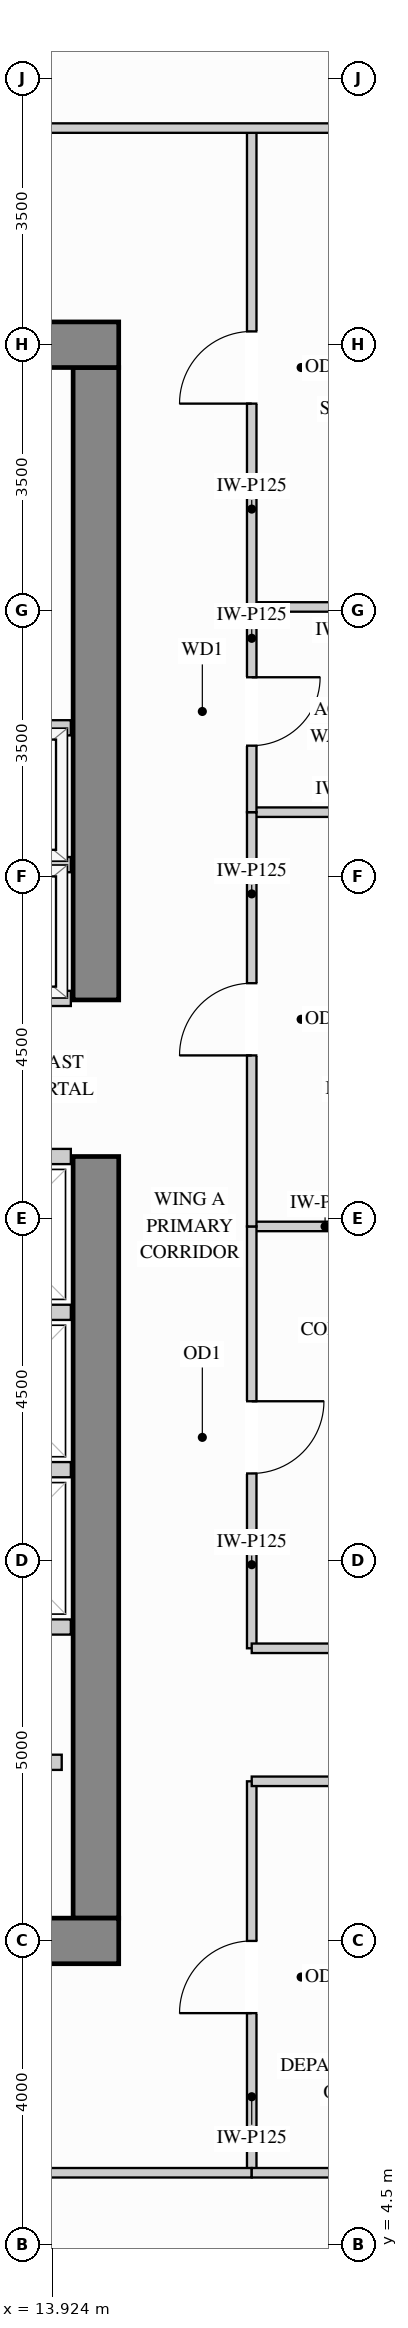
"""IFC4 building model, lengths in metres.
Left out: names, types, materials, properties, quantities, classifications, styles, units other than length and angle.
Written with IfcOpenShell. Run it as: python <this file> out.ifc"""

import sys

from ifc_helpers import new_model, si_unit, direction, frame, frame_2d, origin, place, context, subcontext, project, spatial, rectangle, extrude, source, transform, mapped, element, fill, save


model = new_model("IFC4")
c1 = context("Model", 3, precision=1e-05, world=origin(), true_north=direction((0.0, 1.0)))
c2 = subcontext(c1, "Body", "Model", "MODEL_VIEW")
j1 = project(units=[si_unit("LENGTHUNIT", "METRE"), si_unit("PLANEANGLEUNIT", "RADIAN")], contexts=[c1])
p1 = place(None, origin())
s1 = spatial("IfcSite", under=j1, at=p1, CompositionType="ELEMENT")
p2 = place(p1, origin())
s2 = spatial("IfcBuilding", under=s1, at=p2, CompositionType="ELEMENT")
p3 = place(p2, frame((0.0, 0.0, 171.9)))
s3 = spatial("IfcBuildingStorey", under=s2, at=p3, CompositionType="ELEMENT", Elevation=171.9)
m1 = source(origin(), c2, "Body", "SweptSolid", [
    extrude(rectangle(XDim=10.02, YDim=0.6, at=frame_2d((5.01, 0.0))), origin(), (0.0, 0.0, 1.0), 3.4),
])
p4 = place(p3, frame((14.5, 8.8, 0.0), z_axis=(0.0, 0.0, 1.0), x_axis=(0.0, 1.0, 0.0)))
e1 = element("IfcWall", 1, at=p4, inside=s3, PredefinedType="SHEAR", context=c2, shape_type="MappedRepresentation", body=[
    mapped(m1, transform((0.0, 0.0, 0.0), x_axis=(1.0, 0.0, 0.0), y_axis=(0.0, 1.0, 0.0), z_axis=(0.0, 0.0, 1.0))),
])
m2 = source(origin(), c2, "Body", "SweptSolid", [
    extrude(rectangle(XDim=8.32, YDim=0.6, at=frame_2d((4.16, 0.0))), origin(), (0.0, 0.0, 1.0), 3.4),
])
p5 = place(p3, frame((14.5, 20.88, 0.0), z_axis=(0.0, 0.0, 1.0), x_axis=(0.0, 1.0, 0.0)))
e2 = element("IfcWall", 2, at=p5, inside=s3, PredefinedType="SHEAR", context=c2, shape_type="MappedRepresentation", body=[
    mapped(m2, transform((0.0, 0.0, 0.0), x_axis=(1.0, 0.0, 0.0), y_axis=(0.0, 1.0, 0.0), z_axis=(0.0, 0.0, 1.0))),
])
m3 = source(origin(), c2, "Body", "SweptSolid", [
    extrude(rectangle(XDim=10.6, YDim=0.6, at=frame_2d((5.3, 0.0))), origin(), (0.0, 0.0, 1.0), 3.4),
])
for number, where, z_axis, x_axis in (
    (3, (4.2, 29.5, 0.0), (0.0, 0.0, 1.0), (1.0, 0.0, 0.0)),
    (4, (4.2, 8.5, 0.0), (0.0, 0.0, 1.0), (1.0, 0.0, 0.0)),
):
    element("IfcWall", number, at=place(p3, frame(where, z_axis=z_axis, x_axis=x_axis)), inside=s3, PredefinedType="SHEAR", context=c2, shape_type="MappedRepresentation", body=[
        mapped(m3, transform((0.0, 0.0, 0.0), x_axis=(1.0, 0.0, 0.0), y_axis=(0.0, 1.0, 0.0), z_axis=(0.0, 0.0, 1.0))),
    ])
m4 = source(origin(), c2, "Body", "SweptSolid", [
    extrude(rectangle(XDim=1.93, YDim=0.125, at=frame_2d((0.965, 0.0))), origin(), (0.0, 0.0, 1.0), 2.773),
])
p6 = place(p3, frame((16.55, 17.9, 0.0), z_axis=(0.0, 0.0, 1.0), x_axis=(1.0, 0.0, 0.0)))
e5 = element("IfcWall", 5, at=p6, inside=s3, PredefinedType="PARTITIONING", context=c2, shape_type="MappedRepresentation", body=[
    mapped(m4, transform((0.0, 0.0, 0.0), x_axis=(1.0, 0.0, 0.0), y_axis=(0.0, 1.0, 0.0), z_axis=(0.0, 0.0, 1.0))),
])
m5 = source(origin(), c2, "Body", "SweptSolid", [
    extrude(rectangle(XDim=2.598, YDim=0.125, at=frame_2d((1.299, 0.0))), origin(), (0.0, 0.0, 1.0), 3.385),
])
for number, where, z_axis, x_axis in (
    (6, (16.55, 23.35, 0.0), (0.0, 0.0, 1.0), (1.0, 0.0, 0.0)),
    (7, (16.55, 26.05, 0.0), (0.0, 0.0, 1.0), (1.0, 0.0, 0.0)),
):
    element("IfcWall", number, at=place(p3, frame(where, z_axis=z_axis, x_axis=x_axis)), inside=s3, PredefinedType="PARTITIONING", context=c2, shape_type="MappedRepresentation", body=[
        mapped(m5, transform((0.0, 0.0, 0.0), x_axis=(1.0, 0.0, 0.0), y_axis=(0.0, 1.0, 0.0), z_axis=(0.0, 0.0, 1.0))),
    ])
p7 = place(p3, frame((16.55, 12.35, 0.0), z_axis=(0.0, 0.0, 1.0), x_axis=(0.0, 1.0, 0.0)))
e8 = element("IfcWall", 8, at=p7, inside=s3, PredefinedType="PARTITIONING", context=c2, shape_type="SweptSolid", body=[
    extrude(rectangle(XDim=5.55, YDim=0.125, at=frame_2d((2.775, 0.0))), origin(), (0.0, 0.0, 1.0), 3.385),
])
p8 = place(p7, frame((2.3, 0.0, 0.0)))
e9 = element("IfcOpeningElement", 9, at=p8, cuts=e8, PredefinedType="OPENING", context=c2, shape_type="SweptSolid", body=[
    extrude(rectangle(XDim=0.95, YDim=2.15, at=frame_2d((0.475, 1.075))), frame((0.0, 0.073, 0.0), z_axis=(0.0, -1.0, 0.0), x_axis=(1.0, 0.0, 0.0)), (0.0, 0.0, 1.0), 0.145),
])
p9 = place(p3, frame((16.55, 17.9, 0.0), z_axis=(0.0, 0.0, 1.0), x_axis=(0.0, 1.0, 0.0)))
e10 = element("IfcWall", 10, at=p9, inside=s3, PredefinedType="PARTITIONING", context=c2, shape_type="SweptSolid", body=[
    extrude(rectangle(XDim=5.45, YDim=0.125, at=frame_2d((2.725, 0.0))), origin(), (0.0, 0.0, 1.0), 3.385),
])
p10 = place(p9, frame((2.25, 0.0, 0.0)))
e11 = element("IfcOpeningElement", 11, at=p10, cuts=e10, PredefinedType="OPENING", context=c2, shape_type="SweptSolid", body=[
    extrude(rectangle(XDim=0.95, YDim=2.15, at=frame_2d((0.475, 1.075))), frame((0.0, 0.073, 0.0), z_axis=(0.0, -1.0, 0.0), x_axis=(1.0, 0.0, 0.0)), (0.0, 0.0, 1.0), 0.145),
])
p11 = place(p3, frame((16.55, 26.05, 0.0), z_axis=(0.0, 0.0, 1.0), x_axis=(0.0, 1.0, 0.0)))
e12 = element("IfcWall", 12, at=p11, inside=s3, PredefinedType="PARTITIONING", context=c2, shape_type="SweptSolid", body=[
    extrude(rectangle(XDim=6.3, YDim=0.125, at=frame_2d((3.15, 0.0))), origin(), (0.0, 0.0, 1.0), 3.385),
])
p12 = place(p11, frame((2.675, 0.0, 0.0)))
e13 = element("IfcOpeningElement", 13, at=p12, cuts=e12, PredefinedType="OPENING", context=c2, shape_type="SweptSolid", body=[
    extrude(rectangle(XDim=0.95, YDim=2.15, at=frame_2d((0.475, 1.075))), frame((0.0, 0.073, 0.0), z_axis=(0.0, -1.0, 0.0), x_axis=(1.0, 0.0, 0.0)), (0.0, 0.0, 1.0), 0.145),
])
p13 = place(p3, frame((16.55, 5.45, 0.0), z_axis=(0.0, 0.0, 1.0), x_axis=(0.0, 1.0, 0.0)))
e14 = element("IfcWall", 14, at=p13, inside=s3, PredefinedType="PARTITIONING", context=c2, shape_type="SweptSolid", body=[
    extrude(rectangle(XDim=5.15, YDim=0.125, at=frame_2d((2.575, 0.0))), origin(), (0.0, 0.0, 1.0), 3.385),
])
p14 = place(p13, frame((2.1, 0.0, 0.0)))
e15 = element("IfcOpeningElement", 15, at=p14, cuts=e14, PredefinedType="OPENING", context=c2, shape_type="SweptSolid", body=[
    extrude(rectangle(XDim=0.95, YDim=2.15, at=frame_2d((0.475, 1.075))), frame((0.0, 0.073, 0.0), z_axis=(0.0, -1.0, 0.0), x_axis=(1.0, 0.0, 0.0)), (0.0, 0.0, 1.0), 0.145),
])
p15 = place(p3, frame((16.55, 23.35, 0.0), z_axis=(0.0, 0.0, 1.0), x_axis=(0.0, 1.0, 0.0)))
e16 = element("IfcWall", 16, at=p15, inside=s3, PredefinedType="PARTITIONING", context=c2, shape_type="SweptSolid", body=[
    extrude(rectangle(XDim=2.7, YDim=0.125, at=frame_2d((1.35, 0.0))), origin(), (0.0, 0.0, 1.0), 3.385),
])
p16 = place(p15, frame((0.875, 0.0, 0.0)))
e17 = element("IfcOpeningElement", 17, at=p16, cuts=e16, PredefinedType="OPENING", context=c2, shape_type="SweptSolid", body=[
    extrude(rectangle(XDim=0.9, YDim=2.15, at=frame_2d((0.45, 1.075))), frame((0.0, 0.073, 0.0), z_axis=(0.0, -1.0, 0.0), x_axis=(1.0, 0.0, 0.0)), (0.0, 0.0, 1.0), 0.145),
])
m6 = source(origin(), c2, "Body", "SweptSolid", [
    extrude(rectangle(XDim=5.798, YDim=0.125, at=frame_2d((2.899, 0.0))), origin(), (0.0, 0.0, 1.0), 3.385),
])
p17 = place(p3, frame((13.35, 32.35, 0.0), z_axis=(0.0, 0.0, 1.0), x_axis=(1.0, 0.0, 0.0)))
e18 = element("IfcWall", 18, at=p17, inside=s3, PredefinedType="PARTITIONING", context=c2, shape_type="MappedRepresentation", body=[
    mapped(m6, transform((0.0, 0.0, 0.0), x_axis=(1.0, 0.0, 0.0), y_axis=(0.0, 1.0, 0.0), z_axis=(0.0, 0.0, 1.0))),
])
m7 = source(origin(), c2, "Body", "SweptSolid", [
    extrude(rectangle(XDim=2.95, YDim=0.125, at=frame_2d((1.475, 0.0))), origin(), (0.0, 0.0, 1.0), 3.385),
])
for number, where, z_axis, x_axis in (
    (19, (16.55, 12.35, 0.0), (0.0, 0.0, 1.0), (1.0, 0.0, 0.0)),
    (20, (16.55, 10.6, 0.0), (0.0, 0.0, 1.0), (1.0, 0.0, 0.0)),
):
    element("IfcWall", number, at=place(p3, frame(where, z_axis=z_axis, x_axis=x_axis)), inside=s3, PredefinedType="PARTITIONING", context=c2, shape_type="MappedRepresentation", body=[
        mapped(m7, transform((0.0, 0.0, 0.0), x_axis=(1.0, 0.0, 0.0), y_axis=(0.0, 1.0, 0.0), z_axis=(0.0, 0.0, 1.0))),
    ])
p18 = place(p3, frame((2.45, 5.45, 0.0), z_axis=(0.0, 0.0, 1.0), x_axis=(1.0, 0.0, 0.0)))
e21 = element("IfcWall", 21, at=p18, inside=s3, PredefinedType="PARTITIONING", context=c2, shape_type="SweptSolid", body=[
    extrude(rectangle(XDim=14.1, YDim=0.125, at=frame_2d((7.05, 0.0))), origin(), (0.0, 0.0, 1.0), 3.385),
])
p19 = place(p18, frame((6.575, 0.0, 0.0)))
e22 = element("IfcOpeningElement", 22, at=p19, cuts=e21, PredefinedType="OPENING", context=c2, shape_type="SweptSolid", body=[
    extrude(rectangle(XDim=0.95, YDim=2.15, at=frame_2d((0.475, 1.075))), frame((0.0, 0.073, 0.0), z_axis=(0.0, -1.0, 0.0), x_axis=(1.0, 0.0, 0.0)), (0.0, 0.0, 1.0), 0.145),
])
p20 = place(p3, frame((16.55, 5.45, 0.0), z_axis=(0.0, 0.0, 1.0), x_axis=(1.0, 0.0, 0.0)))
e23 = element("IfcWall", 23, at=p20, inside=s3, PredefinedType="PARTITIONING", context=c2, shape_type="MappedRepresentation", body=[
    mapped(m5, transform((0.0, 0.0, 0.0), x_axis=(1.0, 0.0, 0.0), y_axis=(0.0, 1.0, 0.0), z_axis=(0.0, 0.0, 1.0))),
])
m8 = source(origin(), c2, "Body", "SweptSolid", [
    extrude(rectangle(XDim=1.63, YDim=0.2, at=frame_2d((0.815, 0.0))), origin(), (0.0, 0.0, 1.0), 3.385),
])
p21 = place(p3, frame((12.42, 10.85, 0.0), z_axis=(0.0, 0.0, 1.0), x_axis=(1.0, 0.0, 0.0)))
e24 = element("IfcWall", 24, at=p21, inside=s3, PredefinedType="PARTITIONING", context=c2, shape_type="MappedRepresentation", body=[
    mapped(m8, transform((0.0, 0.0, 0.0), x_axis=(1.0, 0.0, 0.0), y_axis=(0.0, 1.0, 0.0), z_axis=(0.0, 0.0, 1.0))),
])
m9 = source(origin(), c2, "Body", "SweptSolid", [
    extrude(rectangle(XDim=2.34, YDim=0.2, at=frame_2d((1.17, 0.0))), origin(), (0.0, 0.0, 1.0), 3.385),
])
for number, where, z_axis, x_axis in (
    (25, (11.83, 22.66, 0.0), (0.0, 0.0, 1.0), (1.0, 0.0, 0.0)),
    (26, (11.83, 20.9, 0.0), (0.0, 0.0, 1.0), (1.0, 0.0, 0.0)),
    (27, (11.83, 24.46, 0.0), (0.0, 0.0, 1.0), (1.0, 0.0, 0.0)),
):
    element("IfcWall", number, at=place(p3, frame(where, z_axis=z_axis, x_axis=x_axis)), inside=s3, PredefinedType="PARTITIONING", context=c2, shape_type="MappedRepresentation", body=[
        mapped(m9, transform((0.0, 0.0, 0.0), x_axis=(1.0, 0.0, 0.0), y_axis=(0.0, 1.0, 0.0), z_axis=(0.0, 0.0, 1.0))),
    ])
m10 = source(origin(), c2, "Body", "SweptSolid", [
    extrude(rectangle(XDim=1.94, YDim=0.2, at=frame_2d((0.97, 0.0))), origin(), (0.0, 0.0, 1.0), 3.385),
])
for number, where, z_axis, x_axis in (
    (28, (12.23, 14.7, 0.0), (0.0, 0.0, 1.0), (1.0, 0.0, 0.0)),
    (29, (12.23, 12.63, 0.0), (0.0, 0.0, 1.0), (1.0, 0.0, 0.0)),
    (30, (12.23, 16.77, 0.0), (0.0, 0.0, 1.0), (1.0, 0.0, 0.0)),
    (31, (12.23, 18.82, 0.0), (0.0, 0.0, 1.0), (1.0, 0.0, 0.0)),
):
    element("IfcWall", number, at=place(p3, frame(where, z_axis=z_axis, x_axis=x_axis)), inside=s3, PredefinedType="PARTITIONING", context=c2, shape_type="MappedRepresentation", body=[
        mapped(m10, transform((0.0, 0.0, 0.0), x_axis=(1.0, 0.0, 0.0), y_axis=(0.0, 1.0, 0.0), z_axis=(0.0, 0.0, 1.0))),
    ])
m11 = source(origin(), c2, "Body", "SweptSolid", [
    extrude(rectangle(XDim=0.95, YDim=2.15, at=frame_2d((0.475, 1.075))), frame((0.0, 0.025, 0.0), z_axis=(0.0, -1.0, 0.0), x_axis=(1.0, 0.0, 0.0)), (0.0, 0.0, 1.0), 0.05),
])
p22 = place(p14, origin())
e32 = element("IfcDoor", 32, at=p22, inside=s3, OperationType="SINGLE_SWING_LEFT", PredefinedType="DOOR", context=c2, shape_type="MappedRepresentation", body=[
    mapped(m11, transform((0.0, 0.0, 0.0), x_axis=(1.0, 0.0, 0.0), y_axis=(0.0, 1.0, 0.0), z_axis=(0.0, 0.0, 1.0))),
])
fill(e15, e32)
p23 = place(p8, origin())
e33 = element("IfcDoor", 33, at=p23, inside=s3, OperationType="SINGLE_SWING_RIGHT", PredefinedType="DOOR", context=c2, shape_type="MappedRepresentation", body=[
    mapped(m11, transform((0.0, 0.0, 0.0), x_axis=(1.0, 0.0, 0.0), y_axis=(0.0, 1.0, 0.0), z_axis=(0.0, 0.0, 1.0))),
])
fill(e9, e33)
p24 = place(p10, origin())
e34 = element("IfcDoor", 34, at=p24, inside=s3, OperationType="SINGLE_SWING_LEFT", PredefinedType="DOOR", context=c2, shape_type="MappedRepresentation", body=[
    mapped(m11, transform((0.0, 0.0, 0.0), x_axis=(1.0, 0.0, 0.0), y_axis=(0.0, 1.0, 0.0), z_axis=(0.0, 0.0, 1.0))),
])
fill(e11, e34)
p25 = place(p12, origin())
e35 = element("IfcDoor", 35, at=p25, inside=s3, OperationType="SINGLE_SWING_LEFT", PredefinedType="DOOR", context=c2, shape_type="MappedRepresentation", body=[
    mapped(m11, transform((0.0, 0.0, 0.0), x_axis=(1.0, 0.0, 0.0), y_axis=(0.0, 1.0, 0.0), z_axis=(0.0, 0.0, 1.0))),
])
fill(e13, e35)
m12 = source(origin(), c2, "Body", "SweptSolid", [
    extrude(rectangle(XDim=0.9, YDim=2.15, at=frame_2d((0.45, 1.075))), frame((0.0, 0.025, 0.0), z_axis=(0.0, -1.0, 0.0), x_axis=(1.0, 0.0, 0.0)), (0.0, 0.0, 1.0), 0.05),
])
p26 = place(p16, origin())
e36 = element("IfcDoor", 36, at=p26, inside=s3, OperationType="SINGLE_SWING_RIGHT", PredefinedType="DOOR", context=c2, shape_type="MappedRepresentation", body=[
    mapped(m12, transform((0.0, 0.0, 0.0), x_axis=(1.0, 0.0, 0.0), y_axis=(0.0, 1.0, 0.0), z_axis=(0.0, 0.0, 1.0))),
])
fill(e17, e36)
save(model, sys.argv[1])
